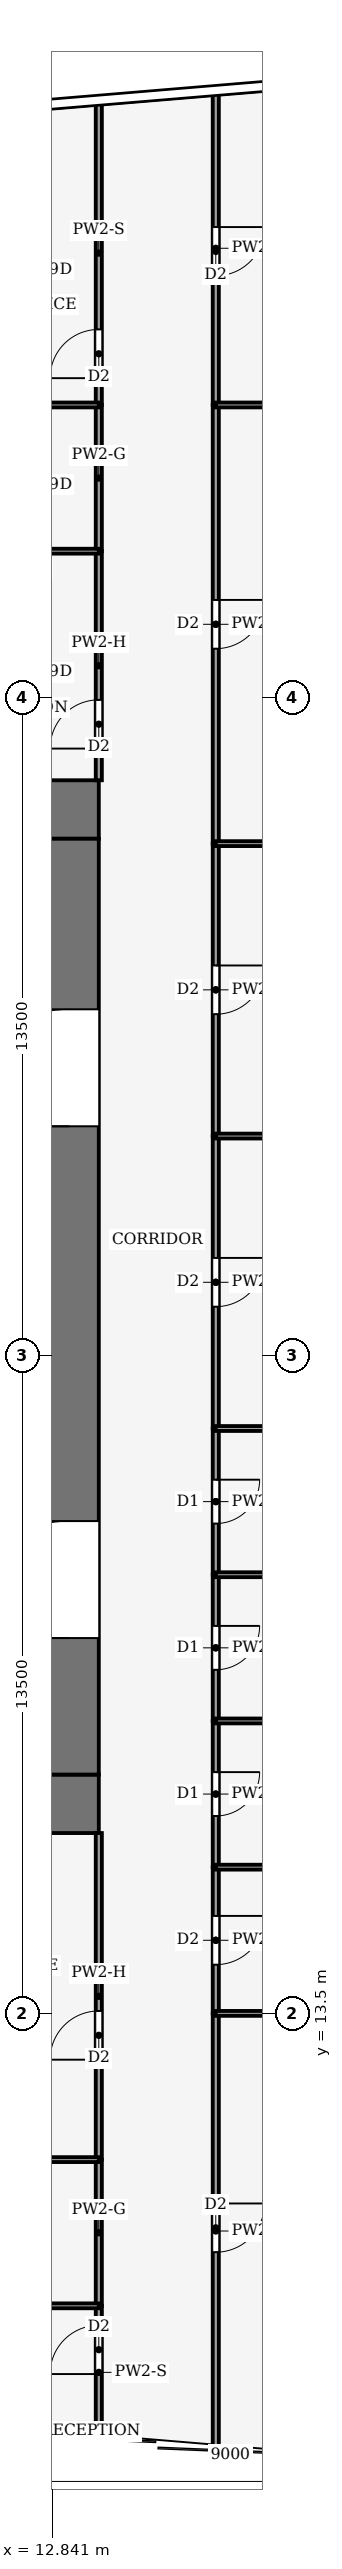
"""IFC4 building model, lengths in metres.
Left out: names, types, materials, properties, quantities, classifications, styles, units other than length and angle.
Written with IfcOpenShell. Run it as: python <this file> out.ifc"""

import sys

from ifc_helpers import new_model, si_unit, direction, frame, frame_2d, origin, place, context, subcontext, project, spatial, rectangle, extrude, element, fill, save


model = new_model("IFC4")
c1 = context("Model", 3, precision=1e-05, world=origin(), true_north=direction((0.0, 1.0)))
c2 = subcontext(c1, "Body", "Model", "MODEL_VIEW")
j1 = project(units=[si_unit("LENGTHUNIT", "METRE"), si_unit("PLANEANGLEUNIT", "RADIAN")], contexts=[c1])
p1 = place(None, origin())
s1 = spatial("IfcSite", under=j1, at=p1, CompositionType="ELEMENT")
p2 = place(p1, origin())
s2 = spatial("IfcBuilding", under=s1, at=p2, CompositionType="ELEMENT")
p3 = place(p2, frame((0.0, 0.0, 86.0)))
s3 = spatial("IfcBuildingStorey", under=s2, at=p3, CompositionType="ELEMENT", Elevation=86.0)
for number, where, z_axis, x_axis in (
    (1, (-13.8, 17.8, -0.13), (0.0, 0.0, 1.0), (1.0, 0.0, 0.0)),
    (2, (-13.8, 38.2, -0.13), (0.0, 0.0, 1.0), (1.0, 0.0, 0.0)),
):
    element("IfcWall", number, at=place(p3, frame(where, z_axis=z_axis, x_axis=x_axis)), inside=s3, PredefinedType="SHEAR", context=c2, shape_type="SweptSolid", body=[
        extrude(rectangle(XDim=27.6, YDim=1.2, at=frame_2d((13.8, 0.0))), origin(), (0.0, 0.0, 1.0), 4.0),
    ])
p4 = place(p3, frame((13.2, 18.4, -0.13), z_axis=(0.0, 0.0, 1.0), x_axis=(0.0, 1.0, 0.0)))
e3 = element("IfcWall", 3, at=p4, inside=s3, PredefinedType="SHEAR", context=c2, shape_type="SweptSolid", body=[
    extrude(rectangle(XDim=19.2, YDim=1.2, at=frame_2d((9.6, 0.0))), origin(), (0.0, 0.0, 1.0), 4.0),
])
p5 = place(p4, frame((2.8, 0.0, 0.13)))
e4 = element("IfcOpeningElement", 4, at=p5, cuts=e3, PredefinedType="OPENING", context=c2, shape_type="SweptSolid", body=[
    extrude(rectangle(XDim=2.4, YDim=2.4, at=frame_2d((1.2, 1.2))), frame((0.0, 0.61, 0.0), z_axis=(0.0, -1.0, 0.0), x_axis=(1.0, 0.0, 0.0)), (0.0, 0.0, 1.0), 1.22),
])
p6 = place(p4, frame((13.3, 0.0, 0.13)))
e5 = element("IfcOpeningElement", 5, at=p6, cuts=e3, PredefinedType="OPENING", context=c2, shape_type="SweptSolid", body=[
    extrude(rectangle(XDim=2.4, YDim=2.4, at=frame_2d((1.2, 1.2))), frame((0.0, 0.61, 0.0), z_axis=(0.0, -1.0, 0.0), x_axis=(1.0, 0.0, 0.0)), (0.0, 0.0, 1.0), 1.22),
])
p7 = place(p3, frame((16.2, 13.5, 0.0), z_axis=(0.0, 0.0, 1.0), x_axis=(0.0, -1.0, 0.0)))
e6 = element("IfcWall", 6, at=p7, inside=s3, PredefinedType="PARTITIONING", context=c2, shape_type="SweptSolid", body=[
    extrude(rectangle(XDim=8.93, YDim=0.125, at=frame_2d((4.465, 0.0))), origin(), (0.0, 0.0, 1.0), 3.04),
])
p8 = place(p7, frame((3.9, 0.0, 0.0)))
e7 = element("IfcOpeningElement", 7, at=p8, cuts=e6, PredefinedType="OPENING", context=c2, shape_type="SweptSolid", body=[
    extrude(rectangle(XDim=1.0, YDim=2.1, at=frame_2d((0.5, 1.05))), frame((0.0, 0.073, 0.0), z_axis=(0.0, -1.0, 0.0), x_axis=(1.0, 0.0, 0.0)), (0.0, 0.0, 1.0), 0.145),
])
p9 = place(p3, frame((16.2, 16.5, 0.0), z_axis=(0.0, 0.0, 1.0), x_axis=(0.0, -1.0, 0.0)))
e8 = element("IfcWall", 8, at=p9, inside=s3, PredefinedType="PARTITIONING", context=c2, shape_type="SweptSolid", body=[
    extrude(rectangle(XDim=3.0, YDim=0.125, at=frame_2d((1.5, 0.0))), origin(), (0.0, 0.0, 1.0), 3.87),
])
p10 = place(p9, frame((1.0, 0.0, 0.0)))
e9 = element("IfcOpeningElement", 9, at=p10, cuts=e8, PredefinedType="OPENING", context=c2, shape_type="SweptSolid", body=[
    extrude(rectangle(XDim=1.0, YDim=2.1, at=frame_2d((0.5, 1.05))), frame((0.0, 0.073, 0.0), z_axis=(0.0, -1.0, 0.0), x_axis=(1.0, 0.0, 0.0)), (0.0, 0.0, 1.0), 0.145),
])
p11 = place(p3, frame((16.2, 19.5, 0.0), z_axis=(0.0, 0.0, 1.0), x_axis=(0.0, -1.0, 0.0)))
e10 = element("IfcWall", 10, at=p11, inside=s3, PredefinedType="PARTITIONING", context=c2, shape_type="SweptSolid", body=[
    extrude(rectangle(XDim=3.0, YDim=0.125, at=frame_2d((1.5, 0.0))), origin(), (0.0, 0.0, 1.0), 3.14),
])
p12 = place(p11, frame((1.05, 0.0, 0.0)))
e11 = element("IfcOpeningElement", 11, at=p12, cuts=e10, PredefinedType="OPENING", context=c2, shape_type="SweptSolid", body=[
    extrude(rectangle(XDim=0.9, YDim=2.1, at=frame_2d((0.45, 1.05))), frame((0.0, 0.073, 0.0), z_axis=(0.0, -1.0, 0.0), x_axis=(1.0, 0.0, 0.0)), (0.0, 0.0, 1.0), 0.145),
])
p13 = place(p3, frame((16.2, 22.5, 0.0), z_axis=(0.0, 0.0, 1.0), x_axis=(0.0, -1.0, 0.0)))
e12 = element("IfcWall", 12, at=p13, inside=s3, PredefinedType="PARTITIONING", context=c2, shape_type="SweptSolid", body=[
    extrude(rectangle(XDim=3.0, YDim=0.125, at=frame_2d((1.5, 0.0))), origin(), (0.0, 0.0, 1.0), 3.87),
])
p14 = place(p13, frame((1.05, 0.0, 0.0)))
e13 = element("IfcOpeningElement", 13, at=p14, cuts=e12, PredefinedType="OPENING", context=c2, shape_type="SweptSolid", body=[
    extrude(rectangle(XDim=0.9, YDim=2.1, at=frame_2d((0.45, 1.05))), frame((0.0, 0.073, 0.0), z_axis=(0.0, -1.0, 0.0), x_axis=(1.0, 0.0, 0.0)), (0.0, 0.0, 1.0), 0.145),
])
p15 = place(p3, frame((16.2, 25.5, 0.0), z_axis=(0.0, 0.0, 1.0), x_axis=(0.0, -1.0, 0.0)))
e14 = element("IfcWall", 14, at=p15, inside=s3, PredefinedType="PARTITIONING", context=c2, shape_type="SweptSolid", body=[
    extrude(rectangle(XDim=3.0, YDim=0.125, at=frame_2d((1.5, 0.0))), origin(), (0.0, 0.0, 1.0), 3.48),
])
p16 = place(p15, frame((1.05, 0.0, 0.0)))
e15 = element("IfcOpeningElement", 15, at=p16, cuts=e14, PredefinedType="OPENING", context=c2, shape_type="SweptSolid", body=[
    extrude(rectangle(XDim=0.9, YDim=2.1, at=frame_2d((0.45, 1.05))), frame((0.0, 0.073, 0.0), z_axis=(0.0, -1.0, 0.0), x_axis=(1.0, 0.0, 0.0)), (0.0, 0.0, 1.0), 0.145),
])
p17 = place(p3, frame((16.2, 31.5, 0.0), z_axis=(0.0, 0.0, 1.0), x_axis=(0.0, -1.0, 0.0)))
e16 = element("IfcWall", 16, at=p17, inside=s3, PredefinedType="PARTITIONING", context=c2, shape_type="SweptSolid", body=[
    extrude(rectangle(XDim=6.0, YDim=0.125, at=frame_2d((3.0, 0.0))), origin(), (0.0, 0.0, 1.0), 3.48),
])
p18 = place(p17, frame((2.5, 0.0, 0.0)))
e17 = element("IfcOpeningElement", 17, at=p18, cuts=e16, PredefinedType="OPENING", context=c2, shape_type="SweptSolid", body=[
    extrude(rectangle(XDim=1.0, YDim=2.1, at=frame_2d((0.5, 1.05))), frame((0.0, 0.073, 0.0), z_axis=(0.0, -1.0, 0.0), x_axis=(1.0, 0.0, 0.0)), (0.0, 0.0, 1.0), 0.145),
])
p19 = place(p3, frame((16.2, 37.5, 0.0), z_axis=(0.0, 0.0, 1.0), x_axis=(0.0, -1.0, 0.0)))
e18 = element("IfcWall", 18, at=p19, inside=s3, PredefinedType="PARTITIONING", context=c2, shape_type="SweptSolid", body=[
    extrude(rectangle(XDim=6.0, YDim=0.125, at=frame_2d((3.0, 0.0))), origin(), (0.0, 0.0, 1.0), 3.48),
])
p20 = place(p19, frame((2.5, 0.0, 0.0)))
e19 = element("IfcOpeningElement", 19, at=p20, cuts=e18, PredefinedType="OPENING", context=c2, shape_type="SweptSolid", body=[
    extrude(rectangle(XDim=1.0, YDim=2.1, at=frame_2d((0.5, 1.05))), frame((0.0, 0.073, 0.0), z_axis=(0.0, -1.0, 0.0), x_axis=(1.0, 0.0, 0.0)), (0.0, 0.0, 1.0), 0.145),
])
p21 = place(p3, frame((16.2, 46.5, 0.0), z_axis=(0.0, 0.0, 1.0), x_axis=(0.0, -1.0, 0.0)))
e20 = element("IfcWall", 20, at=p21, inside=s3, PredefinedType="PARTITIONING", context=c2, shape_type="SweptSolid", body=[
    extrude(rectangle(XDim=9.0, YDim=0.125, at=frame_2d((4.5, 0.0))), origin(), (0.0, 0.0, 1.0), 3.14),
])
p22 = place(p21, frame((4.0, 0.0, 0.0)))
e21 = element("IfcOpeningElement", 21, at=p22, cuts=e20, PredefinedType="OPENING", context=c2, shape_type="SweptSolid", body=[
    extrude(rectangle(XDim=1.0, YDim=2.1, at=frame_2d((0.5, 1.05))), frame((0.0, 0.073, 0.0), z_axis=(0.0, -1.0, 0.0), x_axis=(1.0, 0.0, 0.0)), (0.0, 0.0, 1.0), 0.145),
])
p23 = place(p3, frame((16.2, 52.93, 0.0), z_axis=(0.0, 0.0, 1.0), x_axis=(0.0, -1.0, 0.0)))
e22 = element("IfcWall", 22, at=p23, inside=s3, PredefinedType="PARTITIONING", context=c2, shape_type="SweptSolid", body=[
    extrude(rectangle(XDim=6.43, YDim=0.125, at=frame_2d((3.215, 0.0))), origin(), (0.0, 0.0, 1.0), 3.04),
])
p24 = place(p23, frame((2.78, 0.0, 0.0)))
e23 = element("IfcOpeningElement", 23, at=p24, cuts=e22, PredefinedType="OPENING", context=c2, shape_type="SweptSolid", body=[
    extrude(rectangle(XDim=1.0, YDim=2.1, at=frame_2d((0.5, 1.05))), frame((0.0, 0.073, 0.0), z_axis=(0.0, -1.0, 0.0), x_axis=(1.0, 0.0, 0.0)), (0.0, 0.0, 1.0), 0.145),
])
p25 = place(p3, frame((13.8, 4.77, 0.0), z_axis=(0.0, 0.0, 1.0), x_axis=(0.0, 1.0, 0.0)))
e24 = element("IfcWall", 24, at=p25, inside=s3, PredefinedType="PARTITIONING", context=c2, shape_type="SweptSolid", body=[
    extrude(rectangle(XDim=2.73, YDim=0.125, at=frame_2d((1.365, 0.0))), origin(), (0.0, 0.0, 1.0), 3.04),
])
p26 = place(p25, frame((1.33, 0.0, 0.0)))
e25 = element("IfcOpeningElement", 25, at=p26, cuts=e24, PredefinedType="OPENING", context=c2, shape_type="SweptSolid", body=[
    extrude(rectangle(XDim=1.0, YDim=2.1, at=frame_2d((0.5, 1.05))), frame((0.0, 0.073, 0.0), z_axis=(0.0, -1.0, 0.0), x_axis=(1.0, 0.0, 0.0)), (0.0, 0.0, 1.0), 0.145),
])
p27 = place(p3, frame((13.8, 10.5, 0.0), z_axis=(0.0, 0.0, 1.0), x_axis=(0.0, -1.0, 0.0)))
e26 = element("IfcWall", 26, at=p27, inside=s3, PredefinedType="PARTITIONING", context=c2, shape_type="SweptSolid", body=[
    extrude(rectangle(XDim=3.0, YDim=0.125, at=frame_2d((1.5, 0.0))), origin(), (0.0, 0.0, 1.0), 3.87),
])
p28 = place(p3, frame((13.8, 10.5, 0.0), z_axis=(0.0, 0.0, 1.0), x_axis=(0.0, 1.0, 0.0)))
e27 = element("IfcWall", 27, at=p28, inside=s3, PredefinedType="PARTITIONING", context=c2, shape_type="SweptSolid", body=[
    extrude(rectangle(XDim=6.7, YDim=0.125, at=frame_2d((3.35, 0.0))), origin(), (0.0, 0.0, 1.0), 3.14),
])
p29 = place(p28, frame((2.05, 0.0, 0.0)))
e28 = element("IfcOpeningElement", 28, at=p29, cuts=e27, PredefinedType="OPENING", context=c2, shape_type="SweptSolid", body=[
    extrude(rectangle(XDim=1.0, YDim=2.1, at=frame_2d((0.5, 1.05))), frame((0.0, 0.073, 0.0), z_axis=(0.0, -1.0, 0.0), x_axis=(1.0, 0.0, 0.0)), (0.0, 0.0, 1.0), 0.145),
])
p30 = place(p3, frame((13.8, 38.8, 0.0), z_axis=(0.0, 0.0, 1.0), x_axis=(0.0, 1.0, 0.0)))
e29 = element("IfcWall", 29, at=p30, inside=s3, PredefinedType="PARTITIONING", context=c2, shape_type="SweptSolid", body=[
    extrude(rectangle(XDim=4.7, YDim=0.125, at=frame_2d((2.35, 0.0))), origin(), (0.0, 0.0, 1.0), 3.14),
])
p31 = place(p30, frame((0.65, 0.0, 0.0)))
e30 = element("IfcOpeningElement", 30, at=p31, cuts=e29, PredefinedType="OPENING", context=c2, shape_type="SweptSolid", body=[
    extrude(rectangle(XDim=1.0, YDim=2.1, at=frame_2d((0.5, 1.05))), frame((0.0, 0.073, 0.0), z_axis=(0.0, -1.0, 0.0), x_axis=(1.0, 0.0, 0.0)), (0.0, 0.0, 1.0), 0.145),
])
p32 = place(p3, frame((13.8, 46.5, 0.0), z_axis=(0.0, 0.0, 1.0), x_axis=(0.0, -1.0, 0.0)))
e31 = element("IfcWall", 31, at=p32, inside=s3, PredefinedType="PARTITIONING", context=c2, shape_type="SweptSolid", body=[
    extrude(rectangle(XDim=3.0, YDim=0.125, at=frame_2d((1.5, 0.0))), origin(), (0.0, 0.0, 1.0), 3.87),
])
p33 = place(p3, frame((13.8, 46.5, 0.0), z_axis=(0.0, 0.0, 1.0), x_axis=(0.0, 1.0, 0.0)))
e32 = element("IfcWall", 32, at=p33, inside=s3, PredefinedType="PARTITIONING", context=c2, shape_type="SweptSolid", body=[
    extrude(rectangle(XDim=6.23, YDim=0.125, at=frame_2d((3.115, 0.0))), origin(), (0.0, 0.0, 1.0), 3.04),
])
p34 = place(p33, frame((0.55, 0.0, 0.0)))
e33 = element("IfcOpeningElement", 33, at=p34, cuts=e32, PredefinedType="OPENING", context=c2, shape_type="SweptSolid", body=[
    extrude(rectangle(XDim=1.0, YDim=2.1, at=frame_2d((0.5, 1.05))), frame((0.0, 0.073, 0.0), z_axis=(0.0, -1.0, 0.0), x_axis=(1.0, 0.0, 0.0)), (0.0, 0.0, 1.0), 0.145),
])
p35 = place(p3, frame((23.833, 13.5, 0.0), z_axis=(0.0, 0.0, 1.0), x_axis=(-1.0, 0.0, 0.0)))
e34 = element("IfcWall", 34, at=p35, inside=s3, PredefinedType="PARTITIONING", context=c2, shape_type="SweptSolid", body=[
    extrude(rectangle(XDim=7.634, YDim=0.1, at=frame_2d((3.817, 0.0))), origin(), (0.0, 0.0, 1.0), 3.04),
])
p36 = place(p3, frame((23.587, 16.5, 0.0), z_axis=(0.0, 0.0, 1.0), x_axis=(-1.0, 0.0, 0.0)))
e35 = element("IfcWall", 35, at=p36, inside=s3, PredefinedType="PARTITIONING", context=c2, shape_type="SweptSolid", body=[
    extrude(rectangle(XDim=7.387, YDim=0.1, at=frame_2d((3.693, 0.0))), origin(), (0.0, 0.0, 1.0), 3.04),
])
p37 = place(p3, frame((23.34, 19.5, 0.0), z_axis=(0.0, 0.0, 1.0), x_axis=(-1.0, 0.0, 0.0)))
e36 = element("IfcWall", 36, at=p37, inside=s3, PredefinedType="PARTITIONING", context=c2, shape_type="SweptSolid", body=[
    extrude(rectangle(XDim=7.14, YDim=0.1, at=frame_2d((3.57, 0.0))), origin(), (0.0, 0.0, 1.0), 3.04),
])
p38 = place(p3, frame((23.094, 22.5, 0.0), z_axis=(0.0, 0.0, 1.0), x_axis=(-1.0, 0.0, 0.0)))
e37 = element("IfcWall", 37, at=p38, inside=s3, PredefinedType="PARTITIONING", context=c2, shape_type="SweptSolid", body=[
    extrude(rectangle(XDim=6.894, YDim=0.1, at=frame_2d((3.447, 0.0))), origin(), (0.0, 0.0, 1.0), 3.04),
])
p39 = place(p3, frame((22.847, 25.5, 0.0), z_axis=(0.0, 0.0, 1.0), x_axis=(-1.0, 0.0, 0.0)))
e38 = element("IfcWall", 38, at=p39, inside=s3, PredefinedType="PARTITIONING", context=c2, shape_type="SweptSolid", body=[
    extrude(rectangle(XDim=6.647, YDim=0.1, at=frame_2d((3.324, 0.0))), origin(), (0.0, 0.0, 1.0), 3.04),
])
p40 = place(p3, frame((22.806, 31.5, 0.0), z_axis=(0.0, 0.0, 1.0), x_axis=(-1.0, 0.0, 0.0)))
e39 = element("IfcWall", 39, at=p40, inside=s3, PredefinedType="PARTITIONING", context=c2, shape_type="SweptSolid", body=[
    extrude(rectangle(XDim=6.606, YDim=0.1, at=frame_2d((3.303, 0.0))), origin(), (0.0, 0.0, 1.0), 3.04),
])
p41 = place(p3, frame((23.299, 37.5, 0.0), z_axis=(0.0, 0.0, 1.0), x_axis=(-1.0, 0.0, 0.0)))
e40 = element("IfcWall", 40, at=p41, inside=s3, PredefinedType="PARTITIONING", context=c2, shape_type="SweptSolid", body=[
    extrude(rectangle(XDim=7.099, YDim=0.1, at=frame_2d((3.55, 0.0))), origin(), (0.0, 0.0, 1.0), 3.04),
])
p42 = place(p3, frame((24.039, 46.5, 0.0), z_axis=(0.0, 0.0, 1.0), x_axis=(-1.0, 0.0, 0.0)))
e41 = element("IfcWall", 41, at=p42, inside=s3, PredefinedType="PARTITIONING", context=c2, shape_type="SweptSolid", body=[
    extrude(rectangle(XDim=7.839, YDim=0.1, at=frame_2d((3.919, 0.0))), origin(), (0.0, 0.0, 1.0), 3.04),
])
p43 = place(p3, frame((13.8, 7.5, 0.0), z_axis=(0.0, 0.0, 1.0), x_axis=(-1.0, 0.0, 0.0)))
e42 = element("IfcWall", 42, at=p43, inside=s3, PredefinedType="PARTITIONING", context=c2, shape_type="SweptSolid", body=[
    extrude(rectangle(XDim=6.3, YDim=0.1, at=frame_2d((3.15, 0.0))), origin(), (0.0, 0.0, 1.0), 3.39),
])
p44 = place(p3, frame((13.8, 10.5, 0.0), z_axis=(0.0, 0.0, 1.0), x_axis=(-1.0, 0.0, 0.0)))
e43 = element("IfcWall", 43, at=p44, inside=s3, PredefinedType="PARTITIONING", context=c2, shape_type="SweptSolid", body=[
    extrude(rectangle(XDim=6.3, YDim=0.1, at=frame_2d((3.15, 0.0))), origin(), (0.0, 0.0, 1.0), 3.39),
])
p45 = place(p44, frame((2.65, 0.0, 0.0)))
e44 = element("IfcOpeningElement", 44, at=p45, cuts=e43, PredefinedType="OPENING", context=c2, shape_type="SweptSolid", body=[
    extrude(rectangle(XDim=1.0, YDim=2.1, at=frame_2d((0.5, 1.05))), frame((0.0, 0.06, 0.0), z_axis=(0.0, -1.0, 0.0), x_axis=(1.0, 0.0, 0.0)), (0.0, 0.0, 1.0), 0.12),
])
p46 = place(p3, frame((13.8, 43.5, 0.0), z_axis=(0.0, 0.0, 1.0), x_axis=(-1.0, 0.0, 0.0)))
e45 = element("IfcWall", 45, at=p46, inside=s3, PredefinedType="PARTITIONING", context=c2, shape_type="SweptSolid", body=[
    extrude(rectangle(XDim=3.3, YDim=0.1, at=frame_2d((1.65, 0.0))), origin(), (0.0, 0.0, 1.0), 3.39),
])
p47 = place(p3, frame((13.8, 46.5, 0.0), z_axis=(0.0, 0.0, 1.0), x_axis=(-1.0, 0.0, 0.0)))
e46 = element("IfcWall", 46, at=p47, inside=s3, PredefinedType="PARTITIONING", context=c2, shape_type="SweptSolid", body=[
    extrude(rectangle(XDim=3.3, YDim=0.1, at=frame_2d((1.65, 0.0))), origin(), (0.0, 0.0, 1.0), 3.39),
])
p48 = place(p47, frame((1.95, 0.0, 0.0)))
e47 = element("IfcOpeningElement", 47, at=p48, cuts=e46, PredefinedType="OPENING", context=c2, shape_type="SweptSolid", body=[
    extrude(rectangle(XDim=1.0, YDim=2.1, at=frame_2d((0.5, 1.05))), frame((0.0, 0.06, 0.0), z_axis=(0.0, -1.0, 0.0), x_axis=(1.0, 0.0, 0.0)), (0.0, 0.0, 1.0), 0.12),
])
p49 = place(p5, origin())
e48 = element("IfcDoor", 48, at=p49, inside=s3, OperationType="DOUBLE_DOOR_SINGLE_SWING", PredefinedType="DOOR", context=c2, shape_type="SweptSolid", body=[
    extrude(rectangle(XDim=2.4, YDim=2.4, at=frame_2d((1.2, 1.2))), frame((0.0, 0.025, 0.0), z_axis=(0.0, -1.0, 0.0), x_axis=(1.0, 0.0, 0.0)), (0.0, 0.0, 1.0), 0.05),
])
fill(e4, e48)
p50 = place(p6, origin())
e49 = element("IfcDoor", 49, at=p50, inside=s3, OperationType="DOUBLE_DOOR_SINGLE_SWING", PredefinedType="DOOR", context=c2, shape_type="SweptSolid", body=[
    extrude(rectangle(XDim=2.4, YDim=2.4, at=frame_2d((1.2, 1.2))), frame((0.0, 0.025, 0.0), z_axis=(0.0, -1.0, 0.0), x_axis=(1.0, 0.0, 0.0)), (0.0, 0.0, 1.0), 0.05),
])
fill(e5, e49)
p51 = place(p8, origin())
e50 = element("IfcDoor", 50, at=p51, inside=s3, OperationType="SINGLE_SWING_LEFT", PredefinedType="DOOR", context=c2, shape_type="SweptSolid", body=[
    extrude(rectangle(XDim=1.0, YDim=2.1, at=frame_2d((0.5, 1.05))), frame((0.0, 0.025, 0.0), z_axis=(0.0, -1.0, 0.0), x_axis=(1.0, 0.0, 0.0)), (0.0, 0.0, 1.0), 0.05),
])
fill(e7, e50)
p52 = place(p10, origin())
e51 = element("IfcDoor", 51, at=p52, inside=s3, OperationType="SINGLE_SWING_LEFT", PredefinedType="DOOR", context=c2, shape_type="SweptSolid", body=[
    extrude(rectangle(XDim=1.0, YDim=2.1, at=frame_2d((0.5, 1.05))), frame((0.0, 0.025, 0.0), z_axis=(0.0, -1.0, 0.0), x_axis=(1.0, 0.0, 0.0)), (0.0, 0.0, 1.0), 0.05),
])
fill(e9, e51)
p53 = place(p12, origin())
e52 = element("IfcDoor", 52, at=p53, inside=s3, OperationType="SINGLE_SWING_RIGHT", PredefinedType="DOOR", context=c2, shape_type="SweptSolid", body=[
    extrude(rectangle(XDim=0.9, YDim=2.1, at=frame_2d((0.45, 1.05))), frame((0.0, 0.025, 0.0), z_axis=(0.0, -1.0, 0.0), x_axis=(1.0, 0.0, 0.0)), (0.0, 0.0, 1.0), 0.05),
])
fill(e11, e52)
p54 = place(p14, origin())
e53 = element("IfcDoor", 53, at=p54, inside=s3, OperationType="SINGLE_SWING_LEFT", PredefinedType="DOOR", context=c2, shape_type="SweptSolid", body=[
    extrude(rectangle(XDim=0.9, YDim=2.1, at=frame_2d((0.45, 1.05))), frame((0.0, 0.025, 0.0), z_axis=(0.0, -1.0, 0.0), x_axis=(1.0, 0.0, 0.0)), (0.0, 0.0, 1.0), 0.05),
])
fill(e13, e53)
p55 = place(p16, origin())
e54 = element("IfcDoor", 54, at=p55, inside=s3, OperationType="SINGLE_SWING_RIGHT", PredefinedType="DOOR", context=c2, shape_type="SweptSolid", body=[
    extrude(rectangle(XDim=0.9, YDim=2.1, at=frame_2d((0.45, 1.05))), frame((0.0, 0.025, 0.0), z_axis=(0.0, -1.0, 0.0), x_axis=(1.0, 0.0, 0.0)), (0.0, 0.0, 1.0), 0.05),
])
fill(e15, e54)
p56 = place(p18, origin())
e55 = element("IfcDoor", 55, at=p56, inside=s3, OperationType="SINGLE_SWING_LEFT", PredefinedType="DOOR", context=c2, shape_type="SweptSolid", body=[
    extrude(rectangle(XDim=1.0, YDim=2.1, at=frame_2d((0.5, 1.05))), frame((0.0, 0.025, 0.0), z_axis=(0.0, -1.0, 0.0), x_axis=(1.0, 0.0, 0.0)), (0.0, 0.0, 1.0), 0.05),
])
fill(e17, e55)
p57 = place(p20, origin())
e56 = element("IfcDoor", 56, at=p57, inside=s3, OperationType="SINGLE_SWING_RIGHT", PredefinedType="DOOR", context=c2, shape_type="SweptSolid", body=[
    extrude(rectangle(XDim=1.0, YDim=2.1, at=frame_2d((0.5, 1.05))), frame((0.0, 0.025, 0.0), z_axis=(0.0, -1.0, 0.0), x_axis=(1.0, 0.0, 0.0)), (0.0, 0.0, 1.0), 0.05),
])
fill(e19, e56)
p58 = place(p22, origin())
e57 = element("IfcDoor", 57, at=p58, inside=s3, OperationType="SINGLE_SWING_LEFT", PredefinedType="DOOR", context=c2, shape_type="SweptSolid", body=[
    extrude(rectangle(XDim=1.0, YDim=2.1, at=frame_2d((0.5, 1.05))), frame((0.0, 0.025, 0.0), z_axis=(0.0, -1.0, 0.0), x_axis=(1.0, 0.0, 0.0)), (0.0, 0.0, 1.0), 0.05),
])
fill(e21, e57)
p59 = place(p24, origin())
e58 = element("IfcDoor", 58, at=p59, inside=s3, OperationType="SINGLE_SWING_RIGHT", PredefinedType="DOOR", context=c2, shape_type="SweptSolid", body=[
    extrude(rectangle(XDim=1.0, YDim=2.1, at=frame_2d((0.5, 1.05))), frame((0.0, 0.025, 0.0), z_axis=(0.0, -1.0, 0.0), x_axis=(1.0, 0.0, 0.0)), (0.0, 0.0, 1.0), 0.05),
])
fill(e23, e58)
p60 = place(p26, origin())
e59 = element("IfcDoor", 59, at=p60, inside=s3, OperationType="SINGLE_SWING_RIGHT", PredefinedType="DOOR", context=c2, shape_type="SweptSolid", body=[
    extrude(rectangle(XDim=1.0, YDim=2.1, at=frame_2d((0.5, 1.05))), frame((0.0, 0.025, 0.0), z_axis=(0.0, -1.0, 0.0), x_axis=(1.0, 0.0, 0.0)), (0.0, 0.0, 1.0), 0.05),
])
fill(e25, e59)
p61 = place(p29, origin())
e60 = element("IfcDoor", 60, at=p61, inside=s3, OperationType="SINGLE_SWING_LEFT", PredefinedType="DOOR", context=c2, shape_type="SweptSolid", body=[
    extrude(rectangle(XDim=1.0, YDim=2.1, at=frame_2d((0.5, 1.05))), frame((0.0, 0.025, 0.0), z_axis=(0.0, -1.0, 0.0), x_axis=(1.0, 0.0, 0.0)), (0.0, 0.0, 1.0), 0.05),
])
fill(e28, e60)
p62 = place(p31, origin())
e61 = element("IfcDoor", 61, at=p62, inside=s3, OperationType="SINGLE_SWING_LEFT", PredefinedType="DOOR", context=c2, shape_type="SweptSolid", body=[
    extrude(rectangle(XDim=1.0, YDim=2.1, at=frame_2d((0.5, 1.05))), frame((0.0, 0.025, 0.0), z_axis=(0.0, -1.0, 0.0), x_axis=(1.0, 0.0, 0.0)), (0.0, 0.0, 1.0), 0.05),
])
fill(e30, e61)
p63 = place(p34, origin())
e62 = element("IfcDoor", 62, at=p63, inside=s3, OperationType="SINGLE_SWING_LEFT", PredefinedType="DOOR", context=c2, shape_type="SweptSolid", body=[
    extrude(rectangle(XDim=1.0, YDim=2.1, at=frame_2d((0.5, 1.05))), frame((0.0, 0.025, 0.0), z_axis=(0.0, -1.0, 0.0), x_axis=(1.0, 0.0, 0.0)), (0.0, 0.0, 1.0), 0.05),
])
fill(e33, e62)
save(model, sys.argv[1])
